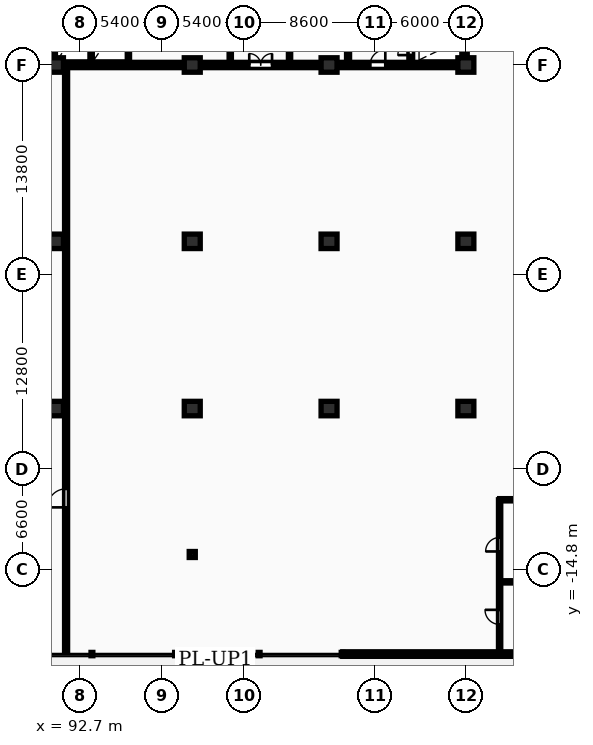
"""IFC4 building model, lengths in metres.
Left out: names, types, materials, properties, quantities, classifications, styles, units other than length and angle.
Written with IfcOpenShell. Run it as: python <this file> out.ifc"""

import sys

from ifc_helpers import new_model, si_unit, direction, frame, frame_2d, origin, origin_2d, place, context, subcontext, project, spatial, rectangle, i_section, extrude, element, fill, save


model = new_model("IFC4")
c1 = context("Model", 3, precision=1e-05, world=origin(), true_north=direction((0.0, 1.0)))
c2 = subcontext(c1, "Body", "Model", "MODEL_VIEW")
j1 = project(units=[si_unit("LENGTHUNIT", "METRE"), si_unit("PLANEANGLEUNIT", "RADIAN")], contexts=[c1])
p1 = place(None, origin())
s1 = spatial("IfcSite", under=j1, at=p1, CompositionType="ELEMENT")
p2 = place(p1, origin())
s2 = spatial("IfcBuilding", under=s1, at=p2, CompositionType="ELEMENT")
p3 = place(p2, frame((0.0, 0.0, 10.0)))
s3 = spatial("IfcBuildingStorey", under=s2, at=p3, CompositionType="ELEMENT", Elevation=10.0)
for number, where, z_axis, x_axis in (
    (1, (91.1, -4.2, 0.0), (0.0, 0.0, 1.0), (1.0, 0.0, 0.0)),
    (2, (91.1, 6.8, 0.0), (0.0, 0.0, 1.0), (1.0, 0.0, 0.0)),
    (3, (91.1, 18.4, 0.0), (0.0, 0.0, 1.0), (1.0, 0.0, 0.0)),
    (4, (100.1, -4.2, 0.0), (0.0, 0.0, 1.0), (1.0, 0.0, 0.0)),
    (5, (100.1, 6.8, 0.0), (0.0, 0.0, 1.0), (1.0, 0.0, 0.0)),
    (6, (100.1, 18.4, 0.0), (0.0, 0.0, 1.0), (1.0, 0.0, 0.0)),
    (7, (109.1, -4.2, 0.0), (0.0, 0.0, 1.0), (1.0, 0.0, 0.0)),
    (8, (109.1, 6.8, 0.0), (0.0, 0.0, 1.0), (1.0, 0.0, 0.0)),
    (9, (109.1, 18.4, 0.0), (0.0, 0.0, 1.0), (1.0, 0.0, 0.0)),
    (10, (118.1, -4.2, 0.0), (0.0, 0.0, 1.0), (1.0, 0.0, 0.0)),
    (11, (118.1, 6.8, 0.0), (0.0, 0.0, 1.0), (1.0, 0.0, 0.0)),
    (12, (118.1, 18.4, 0.0), (0.0, 0.0, 1.0), (1.0, 0.0, 0.0)),
):
    element("IfcColumn", number, at=place(p3, frame(where, z_axis=z_axis, x_axis=x_axis)), inside=s3, PredefinedType="COLUMN", context=c2, shape_type="SweptSolid", body=[
        extrude(rectangle(XDim=1.05, YDim=0.95, at=origin_2d()), origin(), (0.0, 0.0, 1.0), 4.5),
    ])
p4 = place(p3, frame((100.1, -13.8, 0.0), z_axis=(0.0, 0.0, 1.0), x_axis=(1.0, 0.0, 0.0)))
e13 = element("IfcColumn", 13, at=p4, inside=s3, PredefinedType="COLUMN", context=c2, shape_type="SweptSolid", body=[
    extrude(i_section(OverallWidth=0.399, OverallDepth=0.394, WebThickness=0.023, FlangeThickness=0.037, FilletRadius=0.015, at=origin_2d()), origin(), (0.0, 0.0, 1.0), 4.5),
])
p5 = place(p3, frame((110.0, -20.35, 0.0), z_axis=(0.0, 0.0, 1.0), x_axis=(1.0, 0.0, 0.0)))
e14 = element("IfcWall", 14, at=p5, inside=s3, PredefinedType="STANDARD", context=c2, shape_type="SweptSolid", body=[
    extrude(rectangle(XDim=36.8, YDim=0.3, at=frame_2d((18.4, 0.0))), origin(), (0.0, 0.0, 1.0), 4.2),
])
p6 = place(p3, frame((118.015, 18.575, 0.0), z_axis=(0.0, 0.0, 1.0), x_axis=(0.0, 1.0, 0.0)))
e15 = element("IfcWall", 15, at=p6, inside=s3, PredefinedType="SHEAR", context=c2, shape_type="SweptSolid", body=[
    extrude(rectangle(XDim=11.65, YDim=0.35, at=frame_2d((5.825, 0.0))), origin(), (0.0, 0.0, 1.0), 4.5),
])
p7 = place(p3, frame((81.925, 18.4, 0.0), z_axis=(0.0, 0.0, 1.0), x_axis=(1.0, 0.0, 0.0)))
e16 = element("IfcWall", 16, at=p7, inside=s3, PredefinedType="SHEAR", context=c2, shape_type="SweptSolid", body=[
    extrude(rectangle(XDim=36.265, YDim=0.35, at=frame_2d((18.132, 0.0))), origin(), (0.0, 0.0, 1.0), 4.5),
])
p8 = place(p7, frame((5.675, 0.0, 0.0)))
e17 = element("IfcOpeningElement", 17, at=p8, cuts=e16, PredefinedType="OPENING", context=c2, shape_type="SweptSolid", body=[
    extrude(rectangle(XDim=1.0, YDim=2.15, at=frame_2d((0.5, 1.075))), frame((0.0, 0.185, 0.0), z_axis=(0.0, -1.0, 0.0), x_axis=(1.0, 0.0, 0.0)), (0.0, 0.0, 1.0), 0.37),
])
p9 = place(p7, frame((21.925, 0.0, 0.0)))
e18 = element("IfcOpeningElement", 18, at=p9, cuts=e16, PredefinedType="OPENING", context=c2, shape_type="SweptSolid", body=[
    extrude(rectangle(XDim=1.5, YDim=2.2, at=frame_2d((0.75, 1.1))), frame((0.0, 0.185, 0.0), z_axis=(0.0, -1.0, 0.0), x_axis=(1.0, 0.0, 0.0)), (0.0, 0.0, 1.0), 0.37),
])
p10 = place(p7, frame((29.875, 0.0, 0.0)))
e19 = element("IfcOpeningElement", 19, at=p10, cuts=e16, PredefinedType="OPENING", context=c2, shape_type="SweptSolid", body=[
    extrude(rectangle(XDim=1.0, YDim=2.15, at=frame_2d((0.5, 1.075))), frame((0.0, 0.185, 0.0), z_axis=(0.0, -1.0, 0.0), x_axis=(1.0, 0.0, 0.0)), (0.0, 0.0, 1.0), 0.37),
])
p11 = place(p3, frame((90.95, 18.6, 0.0), z_axis=(0.0, 0.0, 1.0), x_axis=(0.0, 1.0, 0.0)))
e20 = element("IfcWall", 20, at=p11, inside=s3, PredefinedType="SHEAR", context=c2, shape_type="SweptSolid", body=[
    extrude(rectangle(XDim=11.6, YDim=0.25, at=frame_2d((5.8, 0.0))), origin(), (0.0, 0.0, 1.0), 4.5),
])
p12 = place(p11, frame((4.6, 0.0, 0.0)))
e21 = element("IfcOpeningElement", 21, at=p12, cuts=e20, PredefinedType="OPENING", context=c2, shape_type="SweptSolid", body=[
    extrude(rectangle(XDim=1.1, YDim=2.1, at=frame_2d((0.55, 1.05))), frame((0.0, 0.135, 0.0), z_axis=(0.0, -1.0, 0.0), x_axis=(1.0, 0.0, 0.0)), (0.0, 0.0, 1.0), 0.27),
])
for number, where, z_axis, x_axis in (
    (22, (93.45, 18.6, 0.0), (0.0, 0.0, 1.0), (0.0, 1.0, 0.0)),
    (23, (95.9, 18.6, 0.0), (0.0, 0.0, 1.0), (0.0, 1.0, 0.0)),
    (24, (102.6, 18.6, 0.0), (0.0, 0.0, 1.0), (0.0, 1.0, 0.0)),
    (25, (106.5, 18.6, 0.0), (0.0, 0.0, 1.0), (0.0, 1.0, 0.0)),
):
    element("IfcWall", number, at=place(p3, frame(where, z_axis=z_axis, x_axis=x_axis)), inside=s3, PredefinedType="PARTITIONING", context=c2, shape_type="SweptSolid", body=[
        extrude(rectangle(XDim=3.6, YDim=0.15, at=frame_2d((1.8, 0.0))), origin(), (0.0, 0.0, 1.0), 4.2),
    ])
p13 = place(p3, frame((110.35, 18.6, 0.0), z_axis=(0.0, 0.0, 1.0), x_axis=(0.0, 1.0, 0.0)))
e26 = element("IfcWall", 26, at=p13, inside=s3, PredefinedType="PARTITIONING", context=c2, shape_type="SweptSolid", body=[
    extrude(rectangle(XDim=11.6, YDim=0.2, at=frame_2d((5.8, 0.0))), origin(), (0.0, 0.0, 1.0), 4.2),
])
p14 = place(p13, frame((5.2, 0.0, 0.0)))
e27 = element("IfcOpeningElement", 27, at=p14, cuts=e26, PredefinedType="OPENING", context=c2, shape_type="SweptSolid", body=[
    extrude(rectangle(XDim=1.1, YDim=2.15, at=frame_2d((0.55, 1.075))), frame((0.0, 0.11, 0.0), z_axis=(0.0, -1.0, 0.0), x_axis=(1.0, 0.0, 0.0)), (0.0, 0.0, 1.0), 0.22),
])
p15 = place(p3, frame((114.475, 18.6, 0.0), z_axis=(0.0, 0.0, 1.0), x_axis=(0.0, 1.0, 0.0)))
e28 = element("IfcWall", 28, at=p15, inside=s3, PredefinedType="SHEAR", context=c2, shape_type="SweptSolid", body=[
    extrude(rectangle(XDim=11.6, YDim=0.25, at=frame_2d((5.8, 0.0))), origin(), (0.0, 0.0, 1.0), 4.5),
])
p16 = place(p15, frame((0.45, 0.0, 0.0)))
e29 = element("IfcOpeningElement", 29, at=p16, cuts=e28, PredefinedType="OPENING", context=c2, shape_type="SweptSolid", body=[
    extrude(rectangle(XDim=0.85, YDim=2.05, at=frame_2d((0.425, 1.025))), frame((0.0, 0.135, 0.0), z_axis=(0.0, -1.0, 0.0), x_axis=(1.0, 0.0, 0.0)), (0.0, 0.0, 1.0), 0.27),
])
p17 = place(p15, frame((2.05, 0.0, 0.0)))
e30 = element("IfcOpeningElement", 30, at=p17, cuts=e28, PredefinedType="OPENING", context=c2, shape_type="SweptSolid", body=[
    extrude(rectangle(XDim=1.1, YDim=2.1, at=frame_2d((0.55, 1.05))), frame((0.0, 0.135, 0.0), z_axis=(0.0, -1.0, 0.0), x_axis=(1.0, 0.0, 0.0)), (0.0, 0.0, 1.0), 0.27),
])
p18 = place(p15, frame((9.95, 0.0, 0.0)))
e31 = element("IfcOpeningElement", 31, at=p18, cuts=e28, PredefinedType="OPENING", context=c2, shape_type="SweptSolid", body=[
    extrude(rectangle(XDim=0.85, YDim=2.05, at=frame_2d((0.425, 1.025))), frame((0.0, 0.135, 0.0), z_axis=(0.0, -1.0, 0.0), x_axis=(1.0, 0.0, 0.0)), (0.0, 0.0, 1.0), 0.27),
])
p19 = place(p3, frame((91.8, -20.2, 0.0), z_axis=(0.0, 0.0, 1.0), x_axis=(0.0, 1.0, 0.0)))
e32 = element("IfcWall", 32, at=p19, inside=s3, PredefinedType="PARTITIONING", context=c2, shape_type="SweptSolid", body=[
    extrude(rectangle(XDim=38.45, YDim=0.2, at=frame_2d((19.225, 0.0))), origin(), (0.0, 0.0, 1.0), 4.2),
])
p20 = place(p19, frame((9.5, 0.0, 0.0)))
e33 = element("IfcOpeningElement", 33, at=p20, cuts=e32, PredefinedType="OPENING", context=c2, shape_type="SweptSolid", body=[
    extrude(rectangle(XDim=1.22, YDim=2.18, at=frame_2d((0.61, 1.09))), frame((0.0, 0.11, 0.0), z_axis=(0.0, -1.0, 0.0), x_axis=(1.0, 0.0, 0.0)), (0.0, 0.0, 1.0), 0.22),
])
p21 = place(p3, frame((120.32, -20.2, 0.0), z_axis=(0.0, 0.0, 1.0), x_axis=(0.0, 1.0, 0.0)))
e34 = element("IfcWall", 34, at=p21, inside=s3, PredefinedType="PARTITIONING", context=c2, shape_type="SweptSolid", body=[
    extrude(rectangle(XDim=10.0, YDim=0.15, at=frame_2d((5.0, 0.0))), origin(), (0.0, 0.0, 1.0), 4.2),
])
p22 = place(p21, frame((1.8, 0.0, 0.0)))
e35 = element("IfcOpeningElement", 35, at=p22, cuts=e34, PredefinedType="OPENING", context=c2, shape_type="SweptSolid", body=[
    extrude(rectangle(XDim=0.96, YDim=2.1, at=frame_2d((0.48, 1.05))), frame((0.0, 0.085, 0.0), z_axis=(0.0, -1.0, 0.0), x_axis=(1.0, 0.0, 0.0)), (0.0, 0.0, 1.0), 0.17),
])
p23 = place(p21, frame((6.6, 0.0, 0.0)))
e36 = element("IfcOpeningElement", 36, at=p23, cuts=e34, PredefinedType="OPENING", context=c2, shape_type="SweptSolid", body=[
    extrude(rectangle(XDim=0.92, YDim=2.08, at=frame_2d((0.46, 1.04))), frame((0.0, 0.085, 0.0), z_axis=(0.0, -1.0, 0.0), x_axis=(1.0, 0.0, 0.0)), (0.0, 0.0, 1.0), 0.17),
])
for number, where, z_axis, x_axis in (
    (37, (120.32, -15.6, 0.0), (0.0, 0.0, 1.0), (1.0, 0.0, 0.0)),
    (38, (120.32, -10.2, 0.0), (0.0, 0.0, 1.0), (1.0, 0.0, 0.0)),
):
    element("IfcWall", number, at=place(p3, frame(where, z_axis=z_axis, x_axis=x_axis)), inside=s3, PredefinedType="PARTITIONING", context=c2, shape_type="SweptSolid", body=[
        extrude(rectangle(XDim=5.18, YDim=0.15, at=frame_2d((2.59, 0.0))), origin(), (0.0, 0.0, 1.0), 4.2),
    ])
p24 = place(p9, origin())
e39 = element("IfcDoor", 39, at=p24, inside=s3, OperationType="DOUBLE_DOOR_SINGLE_SWING", PredefinedType="DOOR", context=c2, shape_type="SweptSolid", body=[
    extrude(rectangle(XDim=1.5, YDim=2.2, at=frame_2d((0.75, 1.1))), frame((0.0, 0.025, 0.0), z_axis=(0.0, -1.0, 0.0), x_axis=(1.0, 0.0, 0.0)), (0.0, 0.0, 1.0), 0.05),
])
fill(e18, e39)
p25 = place(p10, origin())
e40 = element("IfcDoor", 40, at=p25, inside=s3, OperationType="SINGLE_SWING_RIGHT", PredefinedType="DOOR", context=c2, shape_type="SweptSolid", body=[
    extrude(rectangle(XDim=1.0, YDim=2.15, at=frame_2d((0.5, 1.075))), frame((0.0, 0.025, 0.0), z_axis=(0.0, -1.0, 0.0), x_axis=(1.0, 0.0, 0.0)), (0.0, 0.0, 1.0), 0.05),
])
fill(e19, e40)
p26 = place(p16, origin())
e41 = element("IfcDoor", 41, at=p26, inside=s3, OperationType="SINGLE_SWING_LEFT", PredefinedType="DOOR", context=c2, shape_type="SweptSolid", body=[
    extrude(rectangle(XDim=0.85, YDim=2.05, at=frame_2d((0.425, 1.025))), frame((0.0, 0.025, 0.0), z_axis=(0.0, -1.0, 0.0), x_axis=(1.0, 0.0, 0.0)), (0.0, 0.0, 1.0), 0.05),
])
fill(e29, e41)
p27 = place(p20, origin())
e42 = element("IfcDoor", 42, at=p27, inside=s3, OperationType="SINGLE_SWING_LEFT", PredefinedType="DOOR", context=c2, shape_type="SweptSolid", body=[
    extrude(rectangle(XDim=1.22, YDim=2.18, at=frame_2d((0.61, 1.09))), frame((0.0, 0.025, 0.0), z_axis=(0.0, -1.0, 0.0), x_axis=(1.0, 0.0, 0.0)), (0.0, 0.0, 1.0), 0.05),
])
fill(e33, e42)
p28 = place(p22, origin())
e43 = element("IfcDoor", 43, at=p28, inside=s3, OperationType="SINGLE_SWING_RIGHT", PredefinedType="DOOR", context=c2, shape_type="SweptSolid", body=[
    extrude(rectangle(XDim=0.96, YDim=2.1, at=frame_2d((0.48, 1.05))), frame((0.0, 0.025, 0.0), z_axis=(0.0, -1.0, 0.0), x_axis=(1.0, 0.0, 0.0)), (0.0, 0.0, 1.0), 0.05),
])
fill(e35, e43)
p29 = place(p23, origin())
e44 = element("IfcDoor", 44, at=p29, inside=s3, OperationType="SINGLE_SWING_LEFT", PredefinedType="DOOR", context=c2, shape_type="SweptSolid", body=[
    extrude(rectangle(XDim=0.92, YDim=2.08, at=frame_2d((0.46, 1.04))), frame((0.0, 0.025, 0.0), z_axis=(0.0, -1.0, 0.0), x_axis=(1.0, 0.0, 0.0)), (0.0, 0.0, 1.0), 0.05),
])
fill(e36, e44)
save(model, sys.argv[1])
